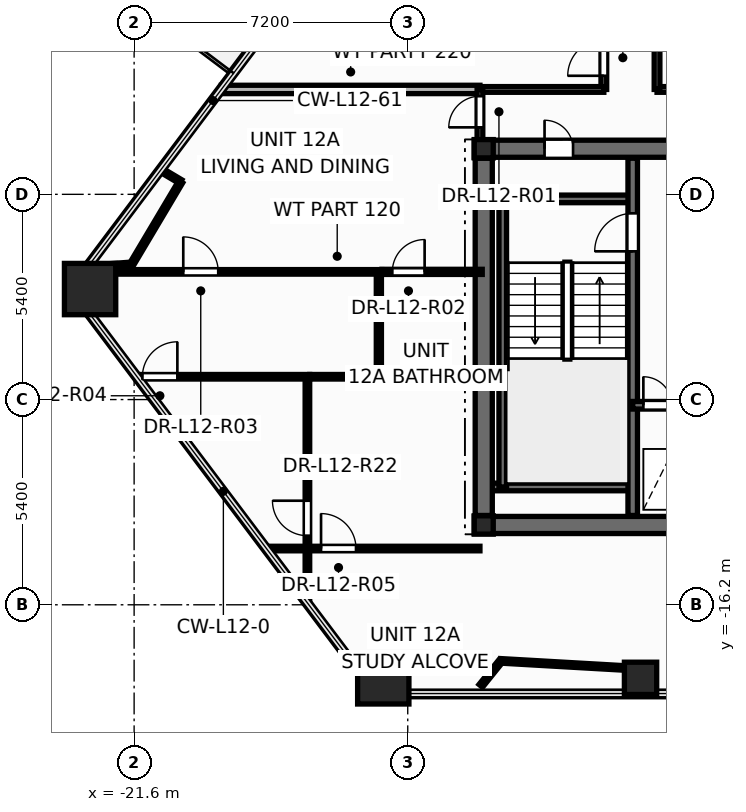
"""IFC4 building model, lengths in metres.
Left out: names, types, materials, properties, quantities, classifications, styles, units other than length and angle.
Written with IfcOpenShell. Run it as: python <this file> out.ifc"""

import sys

from ifc_helpers import new_model, si_unit, direction, frame, frame_2d, origin, origin_2d, place, context, subcontext, project, spatial, rectangle, hollow_rectangle, hollow_circle, i_section, extrude, element, fill, save


model = new_model("IFC4")
c1 = context("Model", 3, precision=1e-05, world=origin(), true_north=direction((0.0, 1.0)))
c2 = subcontext(c1, "Body", "Model", "MODEL_VIEW")
j1 = project(units=[si_unit("LENGTHUNIT", "METRE"), si_unit("PLANEANGLEUNIT", "RADIAN")], contexts=[c1])
p1 = place(None, origin())
s1 = spatial("IfcSite", under=j1, at=p1, CompositionType="ELEMENT")
p2 = place(p1, origin())
s2 = spatial("IfcBuilding", under=s1, at=p2, CompositionType="ELEMENT")
p3 = place(p2, frame((0.0, 0.0, 49.5)))
s3 = spatial("IfcBuildingStorey", under=s2, at=p3, CompositionType="ELEMENT", Elevation=49.5)
for number, where, z_axis, x_axis in (
    (1, (-22.759, -7.892, 0.0), (0.0, 0.0, 1.0), (1.0, 0.0, 0.0)),
    (2, (-15.044, -18.135, 0.0), (0.0, 0.0, 1.0), (1.0, 0.0, 0.0)),
):
    element("IfcColumn", number, at=place(p3, frame(where, z_axis=z_axis, x_axis=x_axis)), inside=s3, PredefinedType="COLUMN", context=c2, shape_type="SweptSolid", body=[
        extrude(hollow_rectangle(XDim=1.35, YDim=1.35, WallThickness=0.065, at=origin_2d()), origin(), (0.0, 0.0, 1.0), 3.6),
    ])
p4 = place(p3, frame((-8.274, -18.135, 0.0), z_axis=(0.0, 0.0, 1.0), x_axis=(1.0, 0.0, 0.0)))
e3 = element("IfcColumn", 3, at=p4, inside=s3, PredefinedType="COLUMN", context=c2, shape_type="SweptSolid", body=[
    extrude(hollow_circle(Radius=0.425, WallThickness=0.038, at=origin_2d()), origin(), (0.0, 0.0, 1.0), 3.6),
])
for number, where, z_axis, x_axis in (
    (4, (-12.4, -14.1, 0.0), (0.0, 0.0, 1.0), (1.0, 0.0, 0.0)),
    (5, (-12.4, -4.2, 0.0), (0.0, 0.0, 1.0), (1.0, 0.0, 0.0)),
):
    element("IfcColumn", number, at=place(p3, frame(where, z_axis=z_axis, x_axis=x_axis)), inside=s3, PredefinedType="COLUMN", context=c2, shape_type="SweptSolid", body=[
        extrude(i_section(OverallWidth=0.5, OverallDepth=0.482, WebThickness=0.04, FlangeThickness=0.045, at=origin_2d()), origin(), (0.0, 0.0, 1.0), 3.6),
    ])
p5 = place(p3, frame((-12.65, -14.1, 0.0), z_axis=(0.0, 0.0, 1.0), x_axis=(1.0, 0.0, 0.0)))
e6 = element("IfcWall", 6, at=p5, inside=s3, PredefinedType="SHEAR", context=c2, shape_type="SweptSolid", body=[
    extrude(rectangle(XDim=25.3, YDim=0.45, at=frame_2d((12.65, 0.0))), origin(), (0.0, 0.0, 1.0), 3.6),
])
p6 = place(p3, frame((-12.65, -4.2, 0.0), z_axis=(0.0, 0.0, 1.0), x_axis=(1.0, 0.0, 0.0)))
e7 = element("IfcWall", 7, at=p6, inside=s3, PredefinedType="SHEAR", context=c2, shape_type="SweptSolid", body=[
    extrude(rectangle(XDim=25.3, YDim=0.45, at=frame_2d((12.65, 0.0))), origin(), (0.0, 0.0, 1.0), 3.6),
])
p7 = place(p6, frame((1.85, 0.0, 0.0)))
e8 = element("IfcOpeningElement", 8, at=p7, cuts=e7, PredefinedType="OPENING", context=c2, shape_type="SweptSolid", body=[
    extrude(rectangle(XDim=0.756, YDim=2.054, at=frame_2d((0.375, 1.027))), frame((0.0, 0.235, 0.0), z_axis=(0.0, -1.0, 0.0), x_axis=(1.0, 0.0, 0.0)), (0.0, 0.0, 1.0), 0.47),
])
p8 = place(p6, frame((22.65, 0.0, 0.0)))
e9 = element("IfcOpeningElement", 9, at=p8, cuts=e7, PredefinedType="OPENING", context=c2, shape_type="SweptSolid", body=[
    extrude(rectangle(XDim=0.756, YDim=2.054, at=frame_2d((0.375, 1.027))), frame((0.0, 0.235, 0.0), z_axis=(0.0, -1.0, 0.0), x_axis=(1.0, 0.0, 0.0)), (0.0, 0.0, 1.0), 0.47),
])
p9 = place(p6, frame((5.85, 0.0, 0.0)))
e10 = element("IfcOpeningElement", 10, at=p9, cuts=e7, PredefinedType="OPENING", context=c2, shape_type="SweptSolid", body=[
    extrude(rectangle(XDim=1.006, YDim=2.104, at=frame_2d((0.5, 1.052))), frame((0.0, 0.235, 0.0), z_axis=(0.0, -1.0, 0.0), x_axis=(1.0, 0.0, 0.0)), (0.0, 0.0, 1.0), 0.47),
])
p10 = place(p6, frame((10.35, 0.0, 0.0)))
e11 = element("IfcOpeningElement", 11, at=p10, cuts=e7, PredefinedType="OPENING", context=c2, shape_type="SweptSolid", body=[
    extrude(rectangle(XDim=1.406, YDim=2.154, at=frame_2d((0.7, 1.077))), frame((0.0, 0.235, 0.0), z_axis=(0.0, -1.0, 0.0), x_axis=(1.0, 0.0, 0.0)), (0.0, 0.0, 1.0), 0.47),
])
p11 = place(p6, frame((18.45, 0.0, 0.0)))
e12 = element("IfcOpeningElement", 12, at=p11, cuts=e7, PredefinedType="OPENING", context=c2, shape_type="SweptSolid", body=[
    extrude(rectangle(XDim=1.006, YDim=2.104, at=frame_2d((0.5, 1.052))), frame((0.0, 0.235, 0.0), z_axis=(0.0, -1.0, 0.0), x_axis=(1.0, 0.0, 0.0)), (0.0, 0.0, 1.0), 0.47),
])
for number, where, z_axis, x_axis in (
    (13, (-12.35, -5.52, 0.0), (0.0, 0.0, 1.0), (1.0, 0.0, 0.0)),
    (14, (-12.35, -13.1, 0.0), (0.0, 0.0, 1.0), (1.0, 0.0, 0.0)),
):
    element("IfcWall", number, at=place(p3, frame(where, z_axis=z_axis, x_axis=x_axis)), inside=s3, PredefinedType="SOLIDWALL", context=c2, shape_type="SweptSolid", body=[
        extrude(rectangle(XDim=3.87, YDim=0.2, at=frame_2d((1.935, 0.0))), origin(), (0.0, 0.0, 1.0), 3.6),
    ])
p12 = place(p3, frame((-11.9, -13.1, 0.0), z_axis=(0.0, 0.0, 1.0), x_axis=(0.0, 1.0, 0.0)))
e15 = element("IfcWall", 15, at=p12, inside=s3, PredefinedType="SOLIDWALL", context=c2, shape_type="SweptSolid", body=[
    extrude(rectangle(XDim=7.58, YDim=0.2, at=frame_2d((3.79, 0.0))), origin(), (0.0, 0.0, 1.0), 3.6),
])
p13 = place(p3, frame((-8.48, -13.85, 0.0), z_axis=(0.0, 0.0, 1.0), x_axis=(0.0, 1.0, 0.0)))
e16 = element("IfcWall", 16, at=p13, inside=s3, PredefinedType="SHEAR", context=c2, shape_type="SweptSolid", body=[
    extrude(rectangle(XDim=9.4, YDim=0.25, at=frame_2d((4.7, 0.0))), origin(), (0.0, 0.0, 1.0), 3.6),
])
p14 = place(p13, frame((6.95, 0.0, 0.0)))
e17 = element("IfcOpeningElement", 17, at=p14, cuts=e16, PredefinedType="OPENING", context=c2, shape_type="SweptSolid", body=[
    extrude(rectangle(XDim=1.006, YDim=2.104, at=frame_2d((0.5, 1.052))), frame((0.0, 0.135, 0.0), z_axis=(0.0, -1.0, 0.0), x_axis=(1.0, 0.0, 0.0)), (0.0, 0.0, 1.0), 0.27),
])
p15 = place(p3, frame((-8.48, -10.95, 0.0), z_axis=(0.0, 0.0, 1.0), x_axis=(1.0, 0.0, 0.0)))
e18 = element("IfcWall", 18, at=p15, inside=s3, PredefinedType="SOLIDWALL", context=c2, shape_type="SweptSolid", body=[
    extrude(rectangle(XDim=3.36, YDim=0.2, at=frame_2d((1.68, 0.0))), origin(), (0.0, 0.0, 1.0), 3.6),
])
p16 = place(p15, frame((0.28, 0.0, 0.0)))
e19 = element("IfcOpeningElement", 19, at=p16, cuts=e18, PredefinedType="OPENING", context=c2, shape_type="SweptSolid", body=[
    extrude(rectangle(XDim=0.756, YDim=2.054, at=frame_2d((0.375, 1.027))), frame((0.0, 0.11, 0.0), z_axis=(0.0, -1.0, 0.0), x_axis=(1.0, 0.0, 0.0)), (0.0, 0.0, 1.0), 0.22),
])
p17 = place(p15, frame((1.85, 0.0, 0.0)))
e20 = element("IfcOpeningElement", 20, at=p17, cuts=e18, PredefinedType="OPENING", context=c2, shape_type="SweptSolid", body=[
    extrude(rectangle(XDim=1.106, YDim=2.104, at=frame_2d((0.55, 1.052))), frame((0.0, 0.11, 0.0), z_axis=(0.0, -1.0, 0.0), x_axis=(1.0, 0.0, 0.0)), (0.0, 0.0, 1.0), 0.22),
])
p18 = place(p3, frame((-12.4, -13.85, 0.0), z_axis=(0.0, 0.0, 1.0), x_axis=(0.0, 1.0, 0.0)))
e21 = element("IfcWall", 21, at=p18, inside=s3, PredefinedType="SHEAR", context=c2, shape_type="SweptSolid", body=[
    extrude(rectangle(XDim=9.4, YDim=0.45, at=frame_2d((4.7, 0.0))), origin(), (0.0, 0.0, 1.0), 3.6),
])
p19 = place(p3, frame((-22.919, -7.44, 0.0), z_axis=(0.0, 0.0, 1.0), x_axis=(1.0, 0.0, 0.0)))
e22 = element("IfcWall", 22, at=p19, inside=s3, PredefinedType="PARTITIONING", context=c2, shape_type="SweptSolid", body=[
    extrude(rectangle(XDim=7.839, YDim=0.12, at=frame_2d((3.919, 0.0))), origin(), (0.0, 0.0, 1.0), 2.325),
])
p20 = place(p19, frame((2.612, 0.0, 0.0)))
e23 = element("IfcOpeningElement", 23, at=p20, cuts=e22, PredefinedType="OPENING", context=c2, shape_type="SweptSolid", body=[
    extrude(rectangle(XDim=0.926, YDim=2.104, at=frame_2d((0.46, 1.052))), frame((0.0, 0.07, 0.0), z_axis=(0.0, -1.0, 0.0), x_axis=(1.0, 0.0, 0.0)), (0.0, 0.0, 1.0), 0.14),
])
p21 = place(p3, frame((-7.84, -2.64, 0.0), z_axis=(0.0, 0.0, 1.0), x_axis=(1.0, 0.0, 0.0)))
e24 = element("IfcWall", 24, at=p21, inside=s3, PredefinedType="PARTITIONING", context=c2, shape_type="SweptSolid", body=[
    extrude(rectangle(XDim=7.7, YDim=0.15, at=frame_2d((3.85, 0.0))), origin(), (0.0, 0.0, 1.0), 2.325),
])
p22 = place(p21, frame((2.117, 0.0, 0.0)))
e25 = element("IfcOpeningElement", 25, at=p22, cuts=e24, PredefinedType="OPENING", context=c2, shape_type="SweptSolid", body=[
    extrude(rectangle(XDim=0.956, YDim=2.104, at=frame_2d((0.475, 1.052))), frame((0.0, 0.085, 0.0), z_axis=(0.0, -1.0, 0.0), x_axis=(1.0, 0.0, 0.0)), (0.0, 0.0, 1.0), 0.17),
])
p23 = place(p3, frame((-9.24, -2.64, 0.0), z_axis=(0.0, 0.0, 1.0), x_axis=(0.0, 1.0, 0.0)))
e26 = element("IfcWall", 26, at=p23, inside=s3, PredefinedType="PARTITIONING", context=c2, shape_type="SweptSolid", body=[
    extrude(rectangle(XDim=6.9, YDim=0.15, at=frame_2d((3.45, 0.0))), origin(), (0.0, 0.0, 1.0), 2.325),
])
p24 = place(p23, frame((0.36, 0.0, 0.0)))
e27 = element("IfcOpeningElement", 27, at=p24, cuts=e26, PredefinedType="OPENING", context=c2, shape_type="SweptSolid", body=[
    extrude(rectangle(XDim=0.956, YDim=2.104, at=frame_2d((0.475, 1.052))), frame((0.0, 0.085, 0.0), z_axis=(0.0, -1.0, 0.0), x_axis=(1.0, 0.0, 0.0)), (0.0, 0.0, 1.0), 0.17),
])
p25 = place(p3, frame((-19.304, -2.64, 0.0), z_axis=(0.0, 0.0, 1.0), x_axis=(1.0, 0.0, 0.0)))
e28 = element("IfcWall", 28, at=p25, inside=s3, PredefinedType="PARTITIONING", context=c2, shape_type="SweptSolid", body=[
    extrude(rectangle(XDim=6.804, YDim=0.22, at=frame_2d((3.402, 0.0))), origin(), (0.0, 0.0, 1.0), 2.713),
])
p26 = place(p3, frame((-7.84, -2.64, 0.0), z_axis=(0.0, 0.0, 1.0), x_axis=(0.0, 1.0, 0.0)))
e29 = element("IfcWall", 29, at=p26, inside=s3, PredefinedType="PARTITIONING", context=c2, shape_type="SweptSolid", body=[
    extrude(rectangle(XDim=8.84, YDim=0.15, at=frame_2d((4.42, 0.0))), origin(), (0.0, 0.0, 1.0), 2.325),
])
p27 = place(p3, frame((-17.04, -16.15, 0.0), z_axis=(0.0, 0.0, 1.0), x_axis=(0.0, 1.0, 0.0)))
e30 = element("IfcWall", 30, at=p27, inside=s3, PredefinedType="PARTITIONING", context=c2, shape_type="SweptSolid", body=[
    extrude(rectangle(XDim=5.95, YDim=0.12, at=frame_2d((2.975, 0.0))), origin(), (0.0, 0.0, 1.0), 2.713),
])
p28 = place(p27, frame((1.769, 0.0, 0.0)))
e31 = element("IfcOpeningElement", 31, at=p28, cuts=e30, PredefinedType="OPENING", context=c2, shape_type="SweptSolid", body=[
    extrude(rectangle(XDim=0.926, YDim=2.104, at=frame_2d((0.46, 1.052))), frame((0.0, 0.07, 0.0), z_axis=(0.0, -1.0, 0.0), x_axis=(1.0, 0.0, 0.0)), (0.0, 0.0, 1.0), 0.14),
])
p29 = place(p3, frame((-18.117, -14.72, 0.0), z_axis=(0.0, 0.0, 1.0), x_axis=(1.0, 0.0, 0.0)))
e32 = element("IfcWall", 32, at=p29, inside=s3, PredefinedType="PARTITIONING", context=c2, shape_type="SweptSolid", body=[
    extrude(rectangle(XDim=5.617, YDim=0.12, at=frame_2d((2.809, 0.0))), origin(), (0.0, 0.0, 1.0), 2.325),
])
p30 = place(p29, frame((1.436, 0.0, 0.0)))
e33 = element("IfcOpeningElement", 33, at=p30, cuts=e32, PredefinedType="OPENING", context=c2, shape_type="SweptSolid", body=[
    extrude(rectangle(XDim=0.926, YDim=2.104, at=frame_2d((0.46, 1.052))), frame((0.0, 0.07, 0.0), z_axis=(0.0, -1.0, 0.0), x_axis=(1.0, 0.0, 0.0)), (0.0, 0.0, 1.0), 0.14),
])
p31 = place(p3, frame((-21.522, -10.2, 0.0), z_axis=(0.0, 0.0, 1.0), x_axis=(1.0, 0.0, 0.0)))
e34 = element("IfcWall", 34, at=p31, inside=s3, PredefinedType="PARTITIONING", context=c2, shape_type="SweptSolid", body=[
    extrude(rectangle(XDim=4.542, YDim=0.12, at=frame_2d((2.271, 0.0))), origin(), (0.0, 0.0, 1.0), 2.713),
])
p32 = place(p31, frame((0.14, 0.0, 0.0)))
e35 = element("IfcOpeningElement", 35, at=p32, cuts=e34, PredefinedType="OPENING", context=c2, shape_type="SweptSolid", body=[
    extrude(rectangle(XDim=0.926, YDim=2.104, at=frame_2d((0.46, 1.052))), frame((0.0, 0.07, 0.0), z_axis=(0.0, -1.0, 0.0), x_axis=(1.0, 0.0, 0.0)), (0.0, 0.0, 1.0), 0.14),
])
p33 = place(p3, frame((-11.949, -17.676, 0.0), z_axis=(0.0, 0.0, 1.0), x_axis=(0.998357508525, -0.057291231189, 0.0)))
e36 = element("IfcWall", 36, at=p33, inside=s3, PredefinedType="PARTITIONING", context=c2, shape_type="SweptSolid", body=[
    extrude(rectangle(XDim=3.801, YDim=0.12, at=frame_2d((1.901, 0.0))), origin(), (0.0, 0.0, 1.0), 2.325),
])
p34 = place(p3, frame((-12.5, -2.64, 0.0), z_axis=(0.0, 0.0, 1.0), x_axis=(1.0, 0.0, 0.0)))
e37 = element("IfcWall", 37, at=p34, inside=s3, PredefinedType="PARTITIONING", context=c2, shape_type="SweptSolid", body=[
    extrude(rectangle(XDim=3.26, YDim=0.15, at=frame_2d((1.63, 0.0))), origin(), (0.0, 0.0, 1.0), 3.35),
])
p35 = place(p3, frame((-15.078, -7.44, 0.0), z_axis=(0.0, 0.0, 1.0), x_axis=(1.0, 0.0, 0.0)))
e38 = element("IfcWall", 38, at=p35, inside=s3, PredefinedType="PARTITIONING", context=c2, shape_type="SweptSolid", body=[
    extrude(rectangle(XDim=2.638, YDim=0.135, at=frame_2d((1.319, 0.0))), origin(), (0.0, 0.0, 1.0), 2.713),
])
p36 = place(p35, frame((0.272, 0.0, 0.0)))
e39 = element("IfcOpeningElement", 39, at=p36, cuts=e38, PredefinedType="OPENING", context=c2, shape_type="SweptSolid", body=[
    extrude(rectangle(XDim=0.856, YDim=2.104, at=frame_2d((0.425, 1.052))), frame((0.0, 0.078, 0.0), z_axis=(0.0, -1.0, 0.0), x_axis=(1.0, 0.0, 0.0)), (0.0, 0.0, 1.0), 0.155),
])
p37 = place(p3, frame((-15.16, -10.2, 0.0), z_axis=(0.0, 0.0, 1.0), x_axis=(0.0, 1.0, 0.0)))
e40 = element("IfcWall", 40, at=p37, inside=s3, PredefinedType="PARTITIONING", context=c2, shape_type="SweptSolid", body=[
    extrude(rectangle(XDim=2.76, YDim=0.135, at=frame_2d((1.38, 0.0))), origin(), (0.0, 0.0, 1.0), 3.35),
])
p38 = place(p3, frame((-15.16, -10.2, 0.0), z_axis=(0.0, 0.0, 1.0), x_axis=(1.0, 0.0, 0.0)))
e41 = element("IfcWall", 41, at=p38, inside=s3, PredefinedType="PARTITIONING", context=c2, shape_type="SweptSolid", body=[
    extrude(rectangle(XDim=2.72, YDim=0.135, at=frame_2d((1.36, 0.0))), origin(), (0.0, 0.0, 1.0), 2.713),
])
p39 = place(p3, frame((-20.374, -5.069, 0.0), z_axis=(0.0, 0.0, 1.0), x_axis=(-0.511270035884, -0.859420124507, 0.0)))
e42 = element("IfcWall", 42, at=p39, inside=s3, PredefinedType="PARTITIONING", context=c2, shape_type="SweptSolid", body=[
    extrude(rectangle(XDim=2.529, YDim=0.12, at=frame_2d((1.265, 0.0))), origin(), (0.0, 0.0, 1.0), 2.325),
])
p40 = place(p3, frame((-16.978, -10.2, 0.0), z_axis=(0.0, 0.0, 1.0), x_axis=(1.0, 0.0, 0.0)))
e43 = element("IfcWall", 43, at=p40, inside=s3, PredefinedType="PARTITIONING", context=c2, shape_type="SweptSolid", body=[
    extrude(rectangle(XDim=1.818, YDim=0.12, at=frame_2d((0.909, 0.0))), origin(), (0.0, 0.0, 1.0), 3.35),
])
p41 = place(p3, frame((-12.5, -4.24, 0.0), z_axis=(0.0, 0.0, 1.0), x_axis=(0.0, 1.0, 0.0)))
e44 = element("IfcWall", 44, at=p41, inside=s3, PredefinedType="PARTITIONING", context=c2, shape_type="SweptSolid", body=[
    extrude(rectangle(XDim=1.6, YDim=0.15, at=frame_2d((0.8, 0.0))), origin(), (0.0, 0.0, 1.0), 2.325),
])
p42 = place(p41, frame((0.602, 0.0, 0.0)))
e45 = element("IfcOpeningElement", 45, at=p42, cuts=e44, PredefinedType="OPENING", context=c2, shape_type="SweptSolid", body=[
    extrude(rectangle(XDim=0.826, YDim=2.104, at=frame_2d((0.41, 1.052))), frame((0.0, 0.085, 0.0), z_axis=(0.0, -1.0, 0.0), x_axis=(1.0, 0.0, 0.0)), (0.0, 0.0, 1.0), 0.17),
])
p43 = place(p3, frame((-12.479, -18.334, 0.0), z_axis=(0.0, 0.0, 1.0), x_axis=(0.626701436355, 0.779259462356, 0.0)))
e46 = element("IfcWall", 46, at=p43, inside=s3, PredefinedType="PARTITIONING", context=c2, shape_type="SweptSolid", body=[
    extrude(rectangle(XDim=0.845, YDim=0.12, at=frame_2d((0.422, 0.0))), origin(), (0.0, 0.0, 1.0), 2.713),
])
p44 = place(p3, frame((-21.667, -7.243, 0.0), z_axis=(0.0, 0.0, 1.0), x_axis=(-0.997468959841, -0.071103264016, 0.0)))
e47 = element("IfcWall", 47, at=p44, inside=s3, PredefinedType="PARTITIONING", context=c2, shape_type="SweptSolid", body=[
    extrude(rectangle(XDim=0.845, YDim=0.12, at=frame_2d((0.422, 0.0))), origin(), (0.0, 0.0, 1.0), 2.325),
])
p45 = place(p3, frame((-8.154, -17.893, 0.0), z_axis=(0.0, 0.0, 1.0), x_axis=(-0.057049790539, -0.998371334424, 0.0)))
e48 = element("IfcWall", 48, at=p45, inside=s3, PredefinedType="PARTITIONING", context=c2, shape_type="SweptSolid", body=[
    extrude(rectangle(XDim=0.633, YDim=0.12, at=frame_2d((0.317, 0.0))), origin(), (0.0, 0.0, 1.0), 2.325),
])
p46 = place(p3, frame((-20.89, -4.762, 0.0), z_axis=(0.0, 0.0, 1.0), x_axis=(0.859424801122, -0.511262174638, 0.0)))
e49 = element("IfcWall", 49, at=p46, inside=s3, PredefinedType="PARTITIONING", context=c2, shape_type="SweptSolid", body=[
    extrude(rectangle(XDim=0.6, YDim=0.12, at=frame_2d((0.3, 0.0))), origin(), (0.0, 0.0, 1.0), 2.713),
])
p47 = place(p14, origin())
e50 = element("IfcDoor", 50, at=p47, inside=s3, OperationType="SINGLE_SWING_LEFT", PredefinedType="DOOR", context=c2, shape_type="SweptSolid", body=[
    extrude(rectangle(XDim=1.0, YDim=2.1, at=frame_2d((0.5, 1.05))), frame((0.0, 0.025, 0.0), z_axis=(0.0, -1.0, 0.0), x_axis=(1.0, 0.0, 0.0)), (0.0, 0.0, 1.0), 0.05),
])
fill(e17, e50)
p48 = place(p16, origin())
e51 = element("IfcDoor", 51, at=p48, inside=s3, OperationType="SINGLE_SWING_LEFT", PredefinedType="DOOR", context=c2, shape_type="SweptSolid", body=[
    extrude(rectangle(XDim=0.75, YDim=2.05, at=frame_2d((0.375, 1.025))), frame((0.0, 0.025, 0.0), z_axis=(0.0, -1.0, 0.0), x_axis=(1.0, 0.0, 0.0)), (0.0, 0.0, 1.0), 0.05),
])
fill(e19, e51)
p49 = place(p7, origin())
e52 = element("IfcDoor", 52, at=p49, inside=s3, OperationType="SINGLE_SWING_LEFT", PredefinedType="DOOR", context=c2, shape_type="SweptSolid", body=[
    extrude(rectangle(XDim=0.75, YDim=2.05, at=frame_2d((0.375, 1.025))), frame((0.0, 0.025, 0.0), z_axis=(0.0, -1.0, 0.0), x_axis=(1.0, 0.0, 0.0)), (0.0, 0.0, 1.0), 0.05),
])
fill(e8, e52)
p50 = place(p42, origin())
e53 = element("IfcDoor", 53, at=p50, inside=s3, OperationType="SINGLE_SWING_LEFT", PredefinedType="DOOR", context=c2, shape_type="SweptSolid", body=[
    extrude(rectangle(XDim=0.82, YDim=2.1, at=frame_2d((0.41, 1.05))), frame((0.0, 0.025, 0.0), z_axis=(0.0, -1.0, 0.0), x_axis=(1.0, 0.0, 0.0)), (0.0, 0.0, 1.0), 0.05),
])
fill(e45, e53)
p51 = place(p36, origin())
e54 = element("IfcDoor", 54, at=p51, inside=s3, OperationType="SINGLE_SWING_RIGHT", PredefinedType="DOOR", context=c2, shape_type="SweptSolid", body=[
    extrude(rectangle(XDim=0.85, YDim=2.1, at=frame_2d((0.425, 1.05))), frame((0.0, 0.025, 0.0), z_axis=(0.0, -1.0, 0.0), x_axis=(1.0, 0.0, 0.0)), (0.0, 0.0, 1.0), 0.05),
])
fill(e39, e54)
p52 = place(p20, origin())
e55 = element("IfcDoor", 55, at=p52, inside=s3, OperationType="SINGLE_SWING_LEFT", PredefinedType="DOOR", context=c2, shape_type="SweptSolid", body=[
    extrude(rectangle(XDim=0.92, YDim=2.1, at=frame_2d((0.46, 1.05))), frame((0.0, 0.025, 0.0), z_axis=(0.0, -1.0, 0.0), x_axis=(1.0, 0.0, 0.0)), (0.0, 0.0, 1.0), 0.05),
])
fill(e23, e55)
p53 = place(p32, origin())
e56 = element("IfcDoor", 56, at=p53, inside=s3, OperationType="SINGLE_SWING_RIGHT", PredefinedType="DOOR", context=c2, shape_type="SweptSolid", body=[
    extrude(rectangle(XDim=0.92, YDim=2.1, at=frame_2d((0.46, 1.05))), frame((0.0, 0.025, 0.0), z_axis=(0.0, -1.0, 0.0), x_axis=(1.0, 0.0, 0.0)), (0.0, 0.0, 1.0), 0.05),
])
fill(e35, e56)
p54 = place(p30, origin())
e57 = element("IfcDoor", 57, at=p54, inside=s3, OperationType="SINGLE_SWING_LEFT", PredefinedType="DOOR", context=c2, shape_type="SweptSolid", body=[
    extrude(rectangle(XDim=0.92, YDim=2.1, at=frame_2d((0.46, 1.05))), frame((0.0, 0.025, 0.0), z_axis=(0.0, -1.0, 0.0), x_axis=(1.0, 0.0, 0.0)), (0.0, 0.0, 1.0), 0.05),
])
fill(e33, e57)
p55 = place(p24, origin())
e58 = element("IfcDoor", 58, at=p55, inside=s3, OperationType="SINGLE_SWING_LEFT", PredefinedType="DOOR", context=c2, shape_type="SweptSolid", body=[
    extrude(rectangle(XDim=0.95, YDim=2.1, at=frame_2d((0.475, 1.05))), frame((0.0, 0.025, 0.0), z_axis=(0.0, -1.0, 0.0), x_axis=(1.0, 0.0, 0.0)), (0.0, 0.0, 1.0), 0.05),
])
fill(e27, e58)
p56 = place(p28, origin())
e59 = element("IfcDoor", 59, at=p56, inside=s3, OperationType="SINGLE_SWING_RIGHT", PredefinedType="DOOR", context=c2, shape_type="SweptSolid", body=[
    extrude(rectangle(XDim=0.92, YDim=2.1, at=frame_2d((0.46, 1.05))), frame((0.0, 0.025, 0.0), z_axis=(0.0, -1.0, 0.0), x_axis=(1.0, 0.0, 0.0)), (0.0, 0.0, 1.0), 0.05),
])
fill(e31, e59)
save(model, sys.argv[1])
